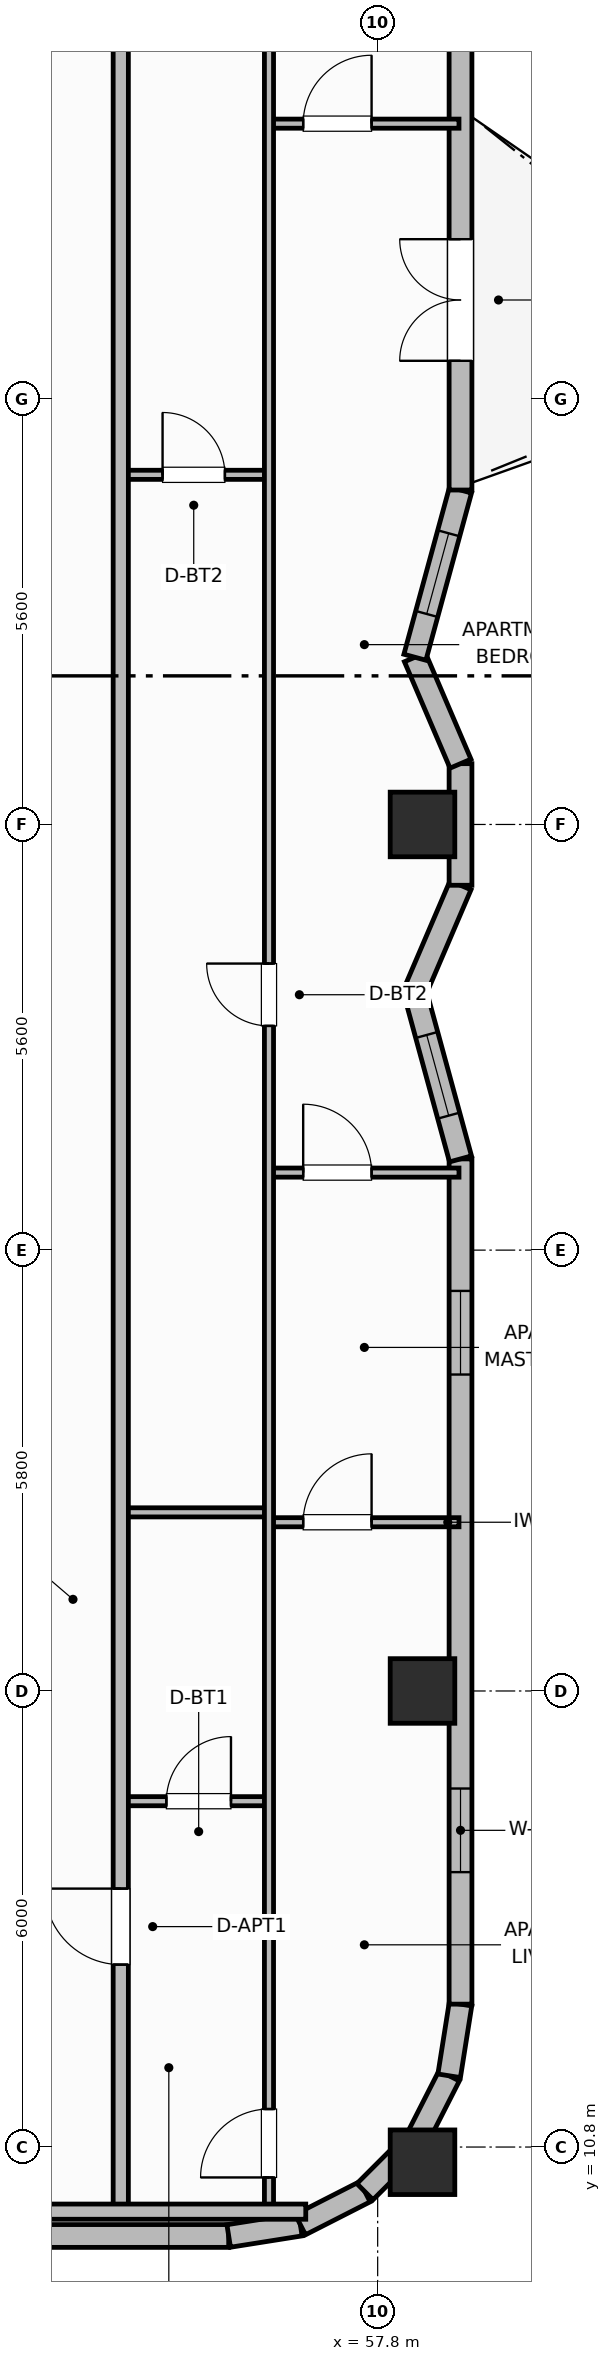
"""IFC4 building model, lengths in metres.
Left out: names, types, materials, properties, quantities, classifications, styles, units other than length and angle.
Written with IfcOpenShell. Run it as: python <this file> out.ifc"""

import sys

from ifc_helpers import new_model, si_unit, direction, frame, frame_2d, origin, origin_2d, place, context, subcontext, project, spatial, rectangle, extrude, element, fill, save


model = new_model("IFC4")
c1 = context("Model", 3, precision=1e-05, world=origin(), true_north=direction((0.0, 1.0)))
c2 = subcontext(c1, "Body", "Model", "MODEL_VIEW")
j1 = project(units=[si_unit("LENGTHUNIT", "METRE"), si_unit("PLANEANGLEUNIT", "RADIAN")], contexts=[c1])
p1 = place(None, origin())
s1 = spatial("IfcSite", under=j1, at=p1, CompositionType="ELEMENT")
p2 = place(p1, origin())
s2 = spatial("IfcBuilding", under=s1, at=p2, CompositionType="ELEMENT")
p3 = place(p2, frame((0.0, 0.0, 248.0)))
s3 = spatial("IfcBuildingStorey", under=s2, at=p3, CompositionType="ELEMENT", Elevation=248.0)
for number, where, z_axis, x_axis in (
    (1, (58.39, 10.6, 0.0), (0.0, 0.0, 1.0), (1.0, 0.0, 0.0)),
    (2, (58.39, 16.8, 0.0), (0.0, 0.0, 1.0), (1.0, 0.0, 0.0)),
    (3, (58.39, 28.2, 0.0), (0.0, 0.0, 1.0), (1.0, 0.0, 0.0)),
):
    element("IfcColumn", number, at=place(p3, frame(where, z_axis=z_axis, x_axis=x_axis)), inside=s3, PredefinedType="COLUMN", context=c2, shape_type="SweptSolid", body=[
        extrude(rectangle(XDim=0.85, YDim=0.85, at=origin_2d()), origin(), (0.0, 0.0, 1.0), 3.7),
    ])
p4 = place(p3, frame((22.56, 9.63, 0.0), z_axis=(0.0, 0.0, 1.0), x_axis=(1.0, 0.0, 0.0)))
e4 = element("IfcWall", 4, at=p4, inside=s3, PredefinedType="SOLIDWALL", context=c2, shape_type="SweptSolid", body=[
    extrude(rectangle(XDim=33.28, YDim=0.3, at=frame_2d((16.64, 0.0))), origin(), (0.0, 0.0, 1.0), 2.73),
])
p5 = place(p4, frame((4.311, 0.0, 0.76)))
e5 = element("IfcOpeningElement", 5, at=p5, cuts=e4, PredefinedType="OPENING", context=c2, shape_type="SweptSolid", body=[
    extrude(rectangle(XDim=1.4, YDim=1.85, at=frame_2d((0.7, 0.925))), frame((0.0, 0.16, 0.0), z_axis=(0.0, -1.0, 0.0), x_axis=(1.0, 0.0, 0.0)), (0.0, 0.0, 1.0), 0.32),
])
p6 = place(p4, frame((7.218, 0.0, 0.76)))
e6 = element("IfcOpeningElement", 6, at=p6, cuts=e4, PredefinedType="OPENING", context=c2, shape_type="SweptSolid", body=[
    extrude(rectangle(XDim=1.4, YDim=1.85, at=frame_2d((0.7, 0.925))), frame((0.0, 0.16, 0.0), z_axis=(0.0, -1.0, 0.0), x_axis=(1.0, 0.0, 0.0)), (0.0, 0.0, 1.0), 0.32),
])
p7 = place(p4, frame((9.775, 0.0, 0.76)))
e7 = element("IfcOpeningElement", 7, at=p7, cuts=e4, PredefinedType="OPENING", context=c2, shape_type="SweptSolid", body=[
    extrude(rectangle(XDim=1.4, YDim=1.85, at=frame_2d((0.7, 0.925))), frame((0.0, 0.16, 0.0), z_axis=(0.0, -1.0, 0.0), x_axis=(1.0, 0.0, 0.0)), (0.0, 0.0, 1.0), 0.32),
])
p8 = place(p4, frame((14.083, 0.0, 0.76)))
e8 = element("IfcOpeningElement", 8, at=p8, cuts=e4, PredefinedType="OPENING", context=c2, shape_type="SweptSolid", body=[
    extrude(rectangle(XDim=1.4, YDim=1.85, at=frame_2d((0.7, 0.925))), frame((0.0, 0.16, 0.0), z_axis=(0.0, -1.0, 0.0), x_axis=(1.0, 0.0, 0.0)), (0.0, 0.0, 1.0), 0.32),
])
p9 = place(p4, frame((15.94, 0.0, 0.76)))
e9 = element("IfcOpeningElement", 9, at=p9, cuts=e4, PredefinedType="OPENING", context=c2, shape_type="SweptSolid", body=[
    extrude(rectangle(XDim=1.4, YDim=1.85, at=frame_2d((0.7, 0.925))), frame((0.0, 0.16, 0.0), z_axis=(0.0, -1.0, 0.0), x_axis=(1.0, 0.0, 0.0)), (0.0, 0.0, 1.0), 0.32),
])
p10 = place(p4, frame((17.797, 0.0, 0.76)))
e10 = element("IfcOpeningElement", 10, at=p10, cuts=e4, PredefinedType="OPENING", context=c2, shape_type="SweptSolid", body=[
    extrude(rectangle(XDim=1.4, YDim=1.85, at=frame_2d((0.7, 0.925))), frame((0.0, 0.16, 0.0), z_axis=(0.0, -1.0, 0.0), x_axis=(1.0, 0.0, 0.0)), (0.0, 0.0, 1.0), 0.32),
])
p11 = place(p4, frame((22.104, 0.0, 0.76)))
e11 = element("IfcOpeningElement", 11, at=p11, cuts=e4, PredefinedType="OPENING", context=c2, shape_type="SweptSolid", body=[
    extrude(rectangle(XDim=1.4, YDim=1.85, at=frame_2d((0.7, 0.925))), frame((0.0, 0.16, 0.0), z_axis=(0.0, -1.0, 0.0), x_axis=(1.0, 0.0, 0.0)), (0.0, 0.0, 1.0), 0.32),
])
p12 = place(p4, frame((24.662, 0.0, 0.76)))
e12 = element("IfcOpeningElement", 12, at=p12, cuts=e4, PredefinedType="OPENING", context=c2, shape_type="SweptSolid", body=[
    extrude(rectangle(XDim=1.4, YDim=1.85, at=frame_2d((0.7, 0.925))), frame((0.0, 0.16, 0.0), z_axis=(0.0, -1.0, 0.0), x_axis=(1.0, 0.0, 0.0)), (0.0, 0.0, 1.0), 0.32),
])
p13 = place(p4, frame((27.569, 0.0, 0.76)))
e13 = element("IfcOpeningElement", 13, at=p13, cuts=e4, PredefinedType="OPENING", context=c2, shape_type="SweptSolid", body=[
    extrude(rectangle(XDim=1.4, YDim=1.85, at=frame_2d((0.7, 0.925))), frame((0.0, 0.16, 0.0), z_axis=(0.0, -1.0, 0.0), x_axis=(1.0, 0.0, 0.0)), (0.0, 0.0, 1.0), 0.32),
])
p14 = place(p3, frame((55.84, 9.63, 0.0), z_axis=(0.0, 0.0, 1.0), x_axis=(0.987663181641, 0.156593229835, 0.0)))
e14 = element("IfcWall", 14, at=p14, inside=s3, PredefinedType="SOLIDWALL", context=c2, shape_type="SweptSolid", body=[
    extrude(rectangle(XDim=0.954, YDim=0.3, at=frame_2d((0.477, 0.0))), origin(), (0.0, 0.0, 1.0), 2.73),
])
for number, where, z_axis, x_axis in (
    (15, (56.782, 9.779, 0.0), (0.0, 0.0, 1.0), (0.891, 0.454, 0.0)),
    (16, (57.633, 10.212, 0.0), (0.0, 0.0, 1.0), (0.707, 0.707, 0.0)),
    (17, (58.308, 10.887, 0.0), (0.0, 0.0, 1.0), (0.454, 0.891, 0.0)),
):
    element("IfcWall", number, at=place(p3, frame(where, z_axis=z_axis, x_axis=x_axis)), inside=s3, PredefinedType="SOLIDWALL", context=c2, shape_type="SweptSolid", body=[
        extrude(rectangle(XDim=0.954, YDim=0.3, at=frame_2d((0.477, 0.0))), origin(), (0.0, 0.0, 1.0), 2.73),
    ])
p15 = place(p3, frame((58.741, 11.738, 0.0), z_axis=(0.0, 0.0, 1.0), x_axis=(0.156343617883, 0.987702725088, 0.0)))
e18 = element("IfcWall", 18, at=p15, inside=s3, PredefinedType="SOLIDWALL", context=c2, shape_type="SweptSolid", body=[
    extrude(rectangle(XDim=0.954, YDim=0.3, at=frame_2d((0.477, 0.0))), origin(), (0.0, 0.0, 1.0), 2.73),
])
p16 = place(p3, frame((58.89, 12.68, 0.0), z_axis=(0.0, 0.0, 1.0), x_axis=(0.0, 1.0, 0.0)))
e19 = element("IfcWall", 19, at=p16, inside=s3, PredefinedType="SOLIDWALL", context=c2, shape_type="SweptSolid", body=[
    extrude(rectangle(XDim=11.12, YDim=0.3, at=frame_2d((5.56, 0.0))), origin(), (0.0, 0.0, 1.0), 2.73),
])
p17 = place(p16, frame((1.737, 0.0, 0.95)))
e20 = element("IfcOpeningElement", 20, at=p17, cuts=e19, PredefinedType="OPENING", context=c2, shape_type="SweptSolid", body=[
    extrude(rectangle(XDim=1.1, YDim=1.65, at=frame_2d((0.55, 0.825))), frame((0.0, 0.16, 0.0), z_axis=(0.0, -1.0, 0.0), x_axis=(1.0, 0.0, 0.0)), (0.0, 0.0, 1.0), 0.32),
])
p18 = place(p16, frame((8.283, 0.0, 0.95)))
e21 = element("IfcOpeningElement", 21, at=p18, cuts=e19, PredefinedType="OPENING", context=c2, shape_type="SweptSolid", body=[
    extrude(rectangle(XDim=1.1, YDim=1.65, at=frame_2d((0.55, 0.825))), frame((0.0, 0.16, 0.0), z_axis=(0.0, -1.0, 0.0), x_axis=(1.0, 0.0, 0.0)), (0.0, 0.0, 1.0), 0.32),
])
p19 = place(p3, frame((58.89, 23.8, 0.0), z_axis=(0.0, 0.0, 1.0), x_axis=(-0.2630630484, 0.964778644336, 0.0)))
e22 = element("IfcWall", 22, at=p19, inside=s3, PredefinedType="SOLIDWALL", context=c2, shape_type="SweptSolid", body=[
    extrude(rectangle(XDim=2.28, YDim=0.3, at=frame_2d((1.14, 0.0))), origin(), (0.0, 0.0, 1.0), 2.73),
])
p20 = place(p19, frame((0.59, 0.0, 0.92)))
e23 = element("IfcOpeningElement", 23, at=p20, cuts=e22, PredefinedType="OPENING", context=c2, shape_type="SweptSolid", body=[
    extrude(rectangle(XDim=1.1, YDim=1.65, at=frame_2d((0.55, 0.825))), frame((0.0, 0.16, 0.0), z_axis=(0.0, -1.0, 0.0), x_axis=(1.0, 0.0, 0.0)), (0.0, 0.0, 1.0), 0.32),
])
p21 = place(p3, frame((58.29, 26.0, 0.0), z_axis=(0.0, 0.0, 1.0), x_axis=(0.393861257526, 0.919169902586, 0.0)))
e24 = element("IfcWall", 24, at=p21, inside=s3, PredefinedType="SOLIDWALL", context=c2, shape_type="SweptSolid", body=[
    extrude(rectangle(XDim=1.523, YDim=0.3, at=frame_2d((0.761, 0.0))), origin(), (0.0, 0.0, 1.0), 2.73),
])
p22 = place(p3, frame((58.89, 27.4, 0.0), z_axis=(0.0, 0.0, 1.0), x_axis=(0.0, 1.0, 0.0)))
e25 = element("IfcWall", 25, at=p22, inside=s3, PredefinedType="SOLIDWALL", context=c2, shape_type="SweptSolid", body=[
    extrude(rectangle(XDim=1.6, YDim=0.3, at=frame_2d((0.8, 0.0))), origin(), (0.0, 0.0, 1.0), 2.73),
])
p23 = place(p3, frame((58.89, 29.0, 0.0), z_axis=(0.0, 0.0, 1.0), x_axis=(-0.393861257526, 0.919169902586, 0.0)))
e26 = element("IfcWall", 26, at=p23, inside=s3, PredefinedType="SOLIDWALL", context=c2, shape_type="SweptSolid", body=[
    extrude(rectangle(XDim=1.523, YDim=0.3, at=frame_2d((0.761, 0.0))), origin(), (0.0, 0.0, 1.0), 2.73),
])
p24 = place(p3, frame((58.29, 30.4, 0.0), z_axis=(0.0, 0.0, 1.0), x_axis=(0.263035877812, 0.96478605244, 0.0)))
e27 = element("IfcWall", 27, at=p24, inside=s3, PredefinedType="SOLIDWALL", context=c2, shape_type="SweptSolid", body=[
    extrude(rectangle(XDim=2.281, YDim=0.3, at=frame_2d((1.14, 0.0))), origin(), (0.0, 0.0, 1.0), 2.73),
])
p25 = place(p24, frame((0.59, 0.0, 0.92)))
e28 = element("IfcOpeningElement", 28, at=p25, cuts=e27, PredefinedType="OPENING", context=c2, shape_type="SweptSolid", body=[
    extrude(rectangle(XDim=1.1, YDim=1.65, at=frame_2d((0.55, 0.825))), frame((0.0, 0.16, 0.0), z_axis=(0.0, -1.0, 0.0), x_axis=(1.0, 0.0, 0.0)), (0.0, 0.0, 1.0), 0.32),
])
p26 = place(p3, frame((58.89, 32.6, 0.0), z_axis=(0.0, 0.0, 1.0), x_axis=(0.0, 1.0, 0.0)))
e29 = element("IfcWall", 29, at=p26, inside=s3, PredefinedType="SOLIDWALL", context=c2, shape_type="SweptSolid", body=[
    extrude(rectangle(XDim=11.12, YDim=0.3, at=frame_2d((5.56, 0.0))), origin(), (0.0, 0.0, 1.0), 2.73),
])
p27 = place(p26, frame((1.7, 0.0, 0.0)))
e30 = element("IfcOpeningElement", 30, at=p27, cuts=e29, PredefinedType="OPENING", context=c2, shape_type="SweptSolid", body=[
    extrude(rectangle(XDim=1.6, YDim=2.1, at=frame_2d((0.8, 1.05))), frame((0.0, 0.16, 0.0), z_axis=(0.0, -1.0, 0.0), x_axis=(1.0, 0.0, 0.0)), (0.0, 0.0, 1.0), 0.32),
])
p28 = place(p26, frame((8.64, 0.0, 0.72)))
e31 = element("IfcOpeningElement", 31, at=p28, cuts=e29, PredefinedType="OPENING", context=c2, shape_type="SweptSolid", body=[
    extrude(rectangle(XDim=1.4, YDim=1.85, at=frame_2d((0.7, 0.925))), frame((0.0, 0.16, 0.0), z_axis=(0.0, -1.0, 0.0), x_axis=(1.0, 0.0, 0.0)), (0.0, 0.0, 1.0), 0.32),
])
p29 = place(p3, frame((54.42, 15.35, 0.0), z_axis=(0.0, 0.0, 1.0), x_axis=(1.0, 0.0, 0.0)))
e32 = element("IfcWall", 32, at=p29, inside=s3, PredefinedType="PARTITIONING", context=c2, shape_type="SweptSolid", body=[
    extrude(rectangle(XDim=1.95, YDim=0.12, at=frame_2d((0.975, 0.0))), origin(), (0.0, 0.0, 1.0), 2.56),
])
p30 = place(p29, frame((0.6, 0.0, 0.0)))
e33 = element("IfcOpeningElement", 33, at=p30, cuts=e32, PredefinedType="OPENING", context=c2, shape_type="SweptSolid", body=[
    extrude(rectangle(XDim=0.85, YDim=2.1, at=frame_2d((0.425, 1.05))), frame((0.0, 0.07, 0.0), z_axis=(0.0, -1.0, 0.0), x_axis=(1.0, 0.0, 0.0)), (0.0, 0.0, 1.0), 0.14),
])
p31 = place(p3, frame((54.42, 19.15, 0.0), z_axis=(0.0, 0.0, 1.0), x_axis=(1.0, 0.0, 0.0)))
e34 = element("IfcWall", 34, at=p31, inside=s3, PredefinedType="PARTITIONING", context=c2, shape_type="SweptSolid", body=[
    extrude(rectangle(XDim=1.95, YDim=0.12, at=frame_2d((0.975, 0.0))), origin(), (0.0, 0.0, 1.0), 2.56),
])
p32 = place(p3, frame((54.42, 32.8, 0.0), z_axis=(0.0, 0.0, 1.0), x_axis=(1.0, 0.0, 0.0)))
e35 = element("IfcWall", 35, at=p32, inside=s3, PredefinedType="PARTITIONING", context=c2, shape_type="SweptSolid", body=[
    extrude(rectangle(XDim=1.95, YDim=0.12, at=frame_2d((0.975, 0.0))), origin(), (0.0, 0.0, 1.0), 2.56),
])
p33 = place(p32, frame((0.55, 0.0, 0.0)))
e36 = element("IfcOpeningElement", 36, at=p33, cuts=e35, PredefinedType="OPENING", context=c2, shape_type="SweptSolid", body=[
    extrude(rectangle(XDim=0.82, YDim=2.08, at=frame_2d((0.41, 1.04))), frame((0.0, 0.07, 0.0), z_axis=(0.0, -1.0, 0.0), x_axis=(1.0, 0.0, 0.0)), (0.0, 0.0, 1.0), 0.14),
])
p34 = place(p3, frame((56.37, 19.02, 0.0), z_axis=(0.0, 0.0, 1.0), x_axis=(1.0, 0.0, 0.0)))
e37 = element("IfcWall", 37, at=p34, inside=s3, PredefinedType="PARTITIONING", context=c2, shape_type="SweptSolid", body=[
    extrude(rectangle(XDim=2.5, YDim=0.12, at=frame_2d((1.25, 0.0))), origin(), (0.0, 0.0, 1.0), 2.56),
])
p35 = place(p34, frame((0.45, 0.0, 0.0)))
e38 = element("IfcOpeningElement", 38, at=p35, cuts=e37, PredefinedType="OPENING", context=c2, shape_type="SweptSolid", body=[
    extrude(rectangle(XDim=0.9, YDim=2.1, at=frame_2d((0.45, 1.05))), frame((0.0, 0.07, 0.0), z_axis=(0.0, -1.0, 0.0), x_axis=(1.0, 0.0, 0.0)), (0.0, 0.0, 1.0), 0.14),
])
p36 = place(p3, frame((56.37, 23.62, 0.0), z_axis=(0.0, 0.0, 1.0), x_axis=(1.0, 0.0, 0.0)))
e39 = element("IfcWall", 39, at=p36, inside=s3, PredefinedType="PARTITIONING", context=c2, shape_type="SweptSolid", body=[
    extrude(rectangle(XDim=2.5, YDim=0.12, at=frame_2d((1.25, 0.0))), origin(), (0.0, 0.0, 1.0), 2.56),
])
p37 = place(p36, frame((0.45, 0.0, 0.0)))
e40 = element("IfcOpeningElement", 40, at=p37, cuts=e39, PredefinedType="OPENING", context=c2, shape_type="SweptSolid", body=[
    extrude(rectangle(XDim=0.9, YDim=2.1, at=frame_2d((0.45, 1.05))), frame((0.0, 0.07, 0.0), z_axis=(0.0, -1.0, 0.0), x_axis=(1.0, 0.0, 0.0)), (0.0, 0.0, 1.0), 0.14),
])
p38 = place(p3, frame((56.37, 37.42, 0.0), z_axis=(0.0, 0.0, 1.0), x_axis=(1.0, 0.0, 0.0)))
e41 = element("IfcWall", 41, at=p38, inside=s3, PredefinedType="PARTITIONING", context=c2, shape_type="SweptSolid", body=[
    extrude(rectangle(XDim=2.5, YDim=0.12, at=frame_2d((1.25, 0.0))), origin(), (0.0, 0.0, 1.0), 2.56),
])
p39 = place(p38, frame((0.45, 0.0, 0.0)))
e42 = element("IfcOpeningElement", 42, at=p39, cuts=e41, PredefinedType="OPENING", context=c2, shape_type="SweptSolid", body=[
    extrude(rectangle(XDim=0.9, YDim=2.1, at=frame_2d((0.45, 1.05))), frame((0.0, 0.07, 0.0), z_axis=(0.0, -1.0, 0.0), x_axis=(1.0, 0.0, 0.0)), (0.0, 0.0, 1.0), 0.14),
])
p40 = place(p3, frame((56.37, 9.99, 0.0), z_axis=(0.0, 0.0, 1.0), x_axis=(0.0, 1.0, 0.0)))
e43 = element("IfcWall", 43, at=p40, inside=s3, PredefinedType="PARTITIONING", context=c2, shape_type="SweptSolid", body=[
    extrude(rectangle(XDim=36.42, YDim=0.12, at=frame_2d((18.21, 0.0))), origin(), (0.0, 0.0, 1.0), 2.56),
])
p41 = place(p40, frame((0.41, 0.0, 0.0)))
e44 = element("IfcOpeningElement", 44, at=p41, cuts=e43, PredefinedType="OPENING", context=c2, shape_type="SweptSolid", body=[
    extrude(rectangle(XDim=0.9, YDim=2.1, at=frame_2d((0.45, 1.05))), frame((0.0, 0.07, 0.0), z_axis=(0.0, -1.0, 0.0), x_axis=(1.0, 0.0, 0.0)), (0.0, 0.0, 1.0), 0.14),
])
p42 = place(p40, frame((15.56, 0.0, 0.0)))
e45 = element("IfcOpeningElement", 45, at=p42, cuts=e43, PredefinedType="OPENING", context=c2, shape_type="SweptSolid", body=[
    extrude(rectangle(XDim=0.82, YDim=2.08, at=frame_2d((0.41, 1.04))), frame((0.0, 0.07, 0.0), z_axis=(0.0, -1.0, 0.0), x_axis=(1.0, 0.0, 0.0)), (0.0, 0.0, 1.0), 0.14),
])
p43 = place(p3, frame((54.42, 9.95, 0.0), z_axis=(0.0, 0.0, 1.0), x_axis=(0.0, 1.0, 0.0)))
e46 = element("IfcWall", 46, at=p43, inside=s3, PredefinedType="PARTITIONING", context=c2, shape_type="SweptSolid", body=[
    extrude(rectangle(XDim=36.5, YDim=0.2, at=frame_2d((18.25, 0.0))), origin(), (0.0, 0.0, 1.0), 2.56),
])
p44 = place(p43, frame((3.25, 0.0, 0.0)))
e47 = element("IfcOpeningElement", 47, at=p44, cuts=e46, PredefinedType="OPENING", context=c2, shape_type="SweptSolid", body=[
    extrude(rectangle(XDim=1.0, YDim=2.15, at=frame_2d((0.5, 1.075))), frame((0.0, 0.11, 0.0), z_axis=(0.0, -1.0, 0.0), x_axis=(1.0, 0.0, 0.0)), (0.0, 0.0, 1.0), 0.22),
])
p45 = place(p3, frame((53.1, 9.95, 0.0), z_axis=(0.0, 0.0, 1.0), x_axis=(1.0, 0.0, 0.0)))
e48 = element("IfcWall", 48, at=p45, inside=s3, PredefinedType="PARTITIONING", context=c2, shape_type="SweptSolid", body=[
    extrude(rectangle(XDim=3.754, YDim=0.2, at=frame_2d((1.877, 0.0))), origin(), (0.0, 0.0, 1.0), 2.56),
])
p46 = place(p17, origin())
e49 = element("IfcWindow", 49, at=p46, inside=s3, PartitioningType="SINGLE_PANEL", PredefinedType="WINDOW", context=c2, shape_type="SweptSolid", body=[
    extrude(rectangle(XDim=1.1, YDim=1.65, at=frame_2d((0.55, 0.825))), frame((0.0, 0.03, 0.0), z_axis=(0.0, -1.0, 0.0), x_axis=(1.0, 0.0, 0.0)), (0.0, 0.0, 1.0), 0.06),
])
fill(e20, e49)
p47 = place(p18, origin())
e50 = element("IfcWindow", 50, at=p47, inside=s3, PartitioningType="SINGLE_PANEL", PredefinedType="WINDOW", context=c2, shape_type="SweptSolid", body=[
    extrude(rectangle(XDim=1.1, YDim=1.65, at=frame_2d((0.55, 0.825))), frame((0.0, 0.03, 0.0), z_axis=(0.0, -1.0, 0.0), x_axis=(1.0, 0.0, 0.0)), (0.0, 0.0, 1.0), 0.06),
])
fill(e21, e50)
p48 = place(p20, origin())
e51 = element("IfcWindow", 51, at=p48, inside=s3, PartitioningType="SINGLE_PANEL", PredefinedType="WINDOW", context=c2, shape_type="SweptSolid", body=[
    extrude(rectangle(XDim=1.1, YDim=1.65, at=frame_2d((0.55, 0.825))), frame((0.0, 0.03, 0.0), z_axis=(0.0, -1.0, 0.0), x_axis=(1.0, 0.0, 0.0)), (0.0, 0.0, 1.0), 0.06),
])
fill(e23, e51)
p49 = place(p25, origin())
e52 = element("IfcWindow", 52, at=p49, inside=s3, PartitioningType="SINGLE_PANEL", PredefinedType="WINDOW", context=c2, shape_type="SweptSolid", body=[
    extrude(rectangle(XDim=1.1, YDim=1.65, at=frame_2d((0.55, 0.825))), frame((0.0, 0.03, 0.0), z_axis=(0.0, -1.0, 0.0), x_axis=(1.0, 0.0, 0.0)), (0.0, 0.0, 1.0), 0.06),
])
fill(e28, e52)
p50 = place(p27, origin())
e53 = element("IfcDoor", 53, at=p50, inside=s3, OperationType="DOUBLE_DOOR_SINGLE_SWING", PredefinedType="DOOR", context=c2, shape_type="SweptSolid", body=[
    extrude(rectangle(XDim=1.6, YDim=2.1, at=frame_2d((0.8, 1.05))), frame((0.0, 0.025, 0.0), z_axis=(0.0, -1.0, 0.0), x_axis=(1.0, 0.0, 0.0)), (0.0, 0.0, 1.0), 0.05),
])
fill(e30, e53)
p51 = place(p30, origin())
e54 = element("IfcDoor", 54, at=p51, inside=s3, OperationType="SINGLE_SWING_RIGHT", PredefinedType="DOOR", context=c2, shape_type="SweptSolid", body=[
    extrude(rectangle(XDim=0.85, YDim=2.1, at=frame_2d((0.425, 1.05))), frame((0.0, 0.025, 0.0), z_axis=(0.0, -1.0, 0.0), x_axis=(1.0, 0.0, 0.0)), (0.0, 0.0, 1.0), 0.05),
])
fill(e33, e54)
p52 = place(p33, origin())
e55 = element("IfcDoor", 55, at=p52, inside=s3, OperationType="SINGLE_SWING_LEFT", PredefinedType="DOOR", context=c2, shape_type="SweptSolid", body=[
    extrude(rectangle(XDim=0.82, YDim=2.08, at=frame_2d((0.41, 1.04))), frame((0.0, 0.025, 0.0), z_axis=(0.0, -1.0, 0.0), x_axis=(1.0, 0.0, 0.0)), (0.0, 0.0, 1.0), 0.05),
])
fill(e36, e55)
p53 = place(p35, origin())
e56 = element("IfcDoor", 56, at=p53, inside=s3, OperationType="SINGLE_SWING_RIGHT", PredefinedType="DOOR", context=c2, shape_type="SweptSolid", body=[
    extrude(rectangle(XDim=0.9, YDim=2.1, at=frame_2d((0.45, 1.05))), frame((0.0, 0.025, 0.0), z_axis=(0.0, -1.0, 0.0), x_axis=(1.0, 0.0, 0.0)), (0.0, 0.0, 1.0), 0.05),
])
fill(e38, e56)
p54 = place(p37, origin())
e57 = element("IfcDoor", 57, at=p54, inside=s3, OperationType="SINGLE_SWING_LEFT", PredefinedType="DOOR", context=c2, shape_type="SweptSolid", body=[
    extrude(rectangle(XDim=0.9, YDim=2.1, at=frame_2d((0.45, 1.05))), frame((0.0, 0.025, 0.0), z_axis=(0.0, -1.0, 0.0), x_axis=(1.0, 0.0, 0.0)), (0.0, 0.0, 1.0), 0.05),
])
fill(e40, e57)
p55 = place(p39, origin())
e58 = element("IfcDoor", 58, at=p55, inside=s3, OperationType="SINGLE_SWING_RIGHT", PredefinedType="DOOR", context=c2, shape_type="SweptSolid", body=[
    extrude(rectangle(XDim=0.9, YDim=2.1, at=frame_2d((0.45, 1.05))), frame((0.0, 0.025, 0.0), z_axis=(0.0, -1.0, 0.0), x_axis=(1.0, 0.0, 0.0)), (0.0, 0.0, 1.0), 0.05),
])
fill(e42, e58)
p56 = place(p41, origin())
e59 = element("IfcDoor", 59, at=p56, inside=s3, OperationType="SINGLE_SWING_LEFT", PredefinedType="DOOR", context=c2, shape_type="SweptSolid", body=[
    extrude(rectangle(XDim=0.9, YDim=2.1, at=frame_2d((0.45, 1.05))), frame((0.0, 0.025, 0.0), z_axis=(0.0, -1.0, 0.0), x_axis=(1.0, 0.0, 0.0)), (0.0, 0.0, 1.0), 0.05),
])
fill(e44, e59)
p57 = place(p42, origin())
e60 = element("IfcDoor", 60, at=p57, inside=s3, OperationType="SINGLE_SWING_RIGHT", PredefinedType="DOOR", context=c2, shape_type="SweptSolid", body=[
    extrude(rectangle(XDim=0.82, YDim=2.08, at=frame_2d((0.41, 1.04))), frame((0.0, 0.025, 0.0), z_axis=(0.0, -1.0, 0.0), x_axis=(1.0, 0.0, 0.0)), (0.0, 0.0, 1.0), 0.05),
])
fill(e45, e60)
p58 = place(p44, origin())
e61 = element("IfcDoor", 61, at=p58, inside=s3, OperationType="SINGLE_SWING_RIGHT", PredefinedType="DOOR", context=c2, shape_type="SweptSolid", body=[
    extrude(rectangle(XDim=1.0, YDim=2.15, at=frame_2d((0.5, 1.075))), frame((0.0, 0.025, 0.0), z_axis=(0.0, -1.0, 0.0), x_axis=(1.0, 0.0, 0.0)), (0.0, 0.0, 1.0), 0.05),
])
fill(e47, e61)
save(model, sys.argv[1])
